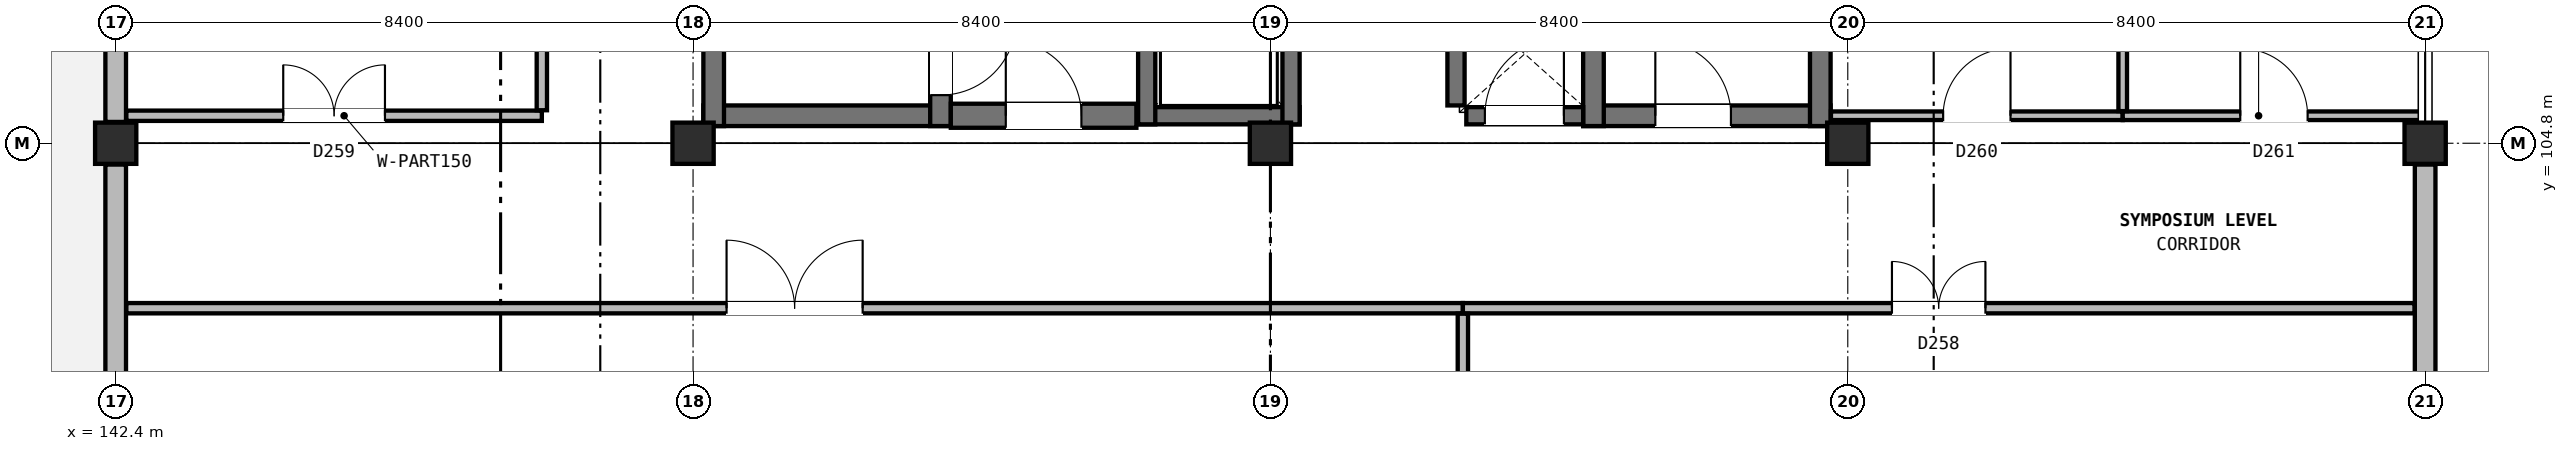
"""IFC4 building model, lengths in metres.
Left out: names, types, materials, properties, quantities, classifications, styles, units other than length and angle.
Written with IfcOpenShell. Run it as: python <this file> out.ifc"""

import sys

from ifc_helpers import new_model, si_unit, direction, frame, frame_2d, origin, origin_2d, place, context, subcontext, project, spatial, rectangle, extrude, element, fill, save


model = new_model("IFC4")
c1 = context("Model", 3, precision=1e-05, world=origin(), true_north=direction((0.0, 1.0)))
c2 = subcontext(c1, "Body", "Model", "MODEL_VIEW")
j1 = project(units=[si_unit("LENGTHUNIT", "METRE"), si_unit("PLANEANGLEUNIT", "RADIAN")], contexts=[c1])
p1 = place(None, origin())
s1 = spatial("IfcSite", under=j1, at=p1, CompositionType="ELEMENT")
p2 = place(p1, origin())
s2 = spatial("IfcBuilding", under=s1, at=p2, CompositionType="ELEMENT")
p3 = place(p2, frame((0.0, 0.0, 48.2)))
s3 = spatial("IfcBuildingStorey", under=s2, at=p3, CompositionType="ELEMENT", Elevation=48.2)
for number, where, z_axis, x_axis in (
    (1, (142.4, 104.8, 0.0), (0.0, 0.0, 1.0), (1.0, 0.0, 0.0)),
    (2, (150.8, 104.8, 0.0), (0.0, 0.0, 1.0), (1.0, 0.0, 0.0)),
    (3, (159.2, 104.8, 0.0), (0.0, 0.0, 1.0), (1.0, 0.0, 0.0)),
    (4, (167.6, 104.8, 0.0), (0.0, 0.0, 1.0), (1.0, 0.0, 0.0)),
    (5, (176.0, 104.8, 0.0), (0.0, 0.0, 1.0), (1.0, 0.0, 0.0)),
):
    element("IfcColumn", number, at=place(p3, frame(where, z_axis=z_axis, x_axis=x_axis)), inside=s3, PredefinedType="COLUMN", context=c2, shape_type="SweptSolid", body=[
        extrude(rectangle(XDim=0.6, YDim=0.6, at=origin_2d()), origin(), (0.0, 0.0, 1.0), 4.0),
    ])
p4 = place(p3, frame((176.0, 96.31, 0.0), z_axis=(0.0, 0.0, 1.0), x_axis=(0.0, 1.0, 0.0)))
e6 = element("IfcWall", 6, at=p4, inside=s3, PredefinedType="SOLIDWALL", context=c2, shape_type="SweptSolid", body=[
    extrude(rectangle(XDim=8.18, YDim=0.3, at=frame_2d((4.09, 0.0))), origin(), (0.0, 0.0, 1.0), 3.25),
])
p5 = place(p4, frame((2.005, 0.0, 0.9)))
e7 = element("IfcOpeningElement", 7, at=p5, cuts=e6, PredefinedType="OPENING", context=c2, shape_type="SweptSolid", body=[
    extrude(rectangle(XDim=2.08, YDim=2.04, at=frame_2d((1.04, 1.02))), frame((0.0, 0.16, 0.0), z_axis=(0.0, -1.0, 0.0), x_axis=(1.0, 0.0, 0.0)), (0.0, 0.0, 1.0), 0.32),
])
p6 = place(p3, frame((142.4, 113.29, 0.0), z_axis=(0.0, 0.0, 1.0), x_axis=(0.0, -1.0, 0.0)))
e8 = element("IfcWall", 8, at=p6, inside=s3, PredefinedType="SOLIDWALL", context=c2, shape_type="SweptSolid", body=[
    extrude(rectangle(XDim=8.18, YDim=0.3, at=frame_2d((4.09, 0.0))), origin(), (0.0, 0.0, 1.0), 3.25),
])
p7 = place(p6, frame((2.345, 0.0, 0.9)))
e9 = element("IfcOpeningElement", 9, at=p7, cuts=e8, PredefinedType="OPENING", context=c2, shape_type="SweptSolid", body=[
    extrude(rectangle(XDim=3.4, YDim=2.15, at=frame_2d((1.7, 1.075))), frame((0.0, 0.16, 0.0), z_axis=(0.0, -1.0, 0.0), x_axis=(1.0, 0.0, 0.0)), (0.0, 0.0, 1.0), 0.32),
])
p8 = place(p3, frame((142.4, 104.49, 0.0), z_axis=(0.0, 0.0, 1.0), x_axis=(0.0, -1.0, 0.0)))
e10 = element("IfcWall", 10, at=p8, inside=s3, PredefinedType="SOLIDWALL", context=c2, shape_type="SweptSolid", body=[
    extrude(rectangle(XDim=8.18, YDim=0.3, at=frame_2d((4.09, 0.0))), origin(), (0.0, 0.0, 1.0), 3.25),
])
p9 = place(p8, frame((3.415, 0.0, 0.0)))
e11 = element("IfcOpeningElement", 11, at=p9, cuts=e10, PredefinedType="OPENING", context=c2, shape_type="SweptSolid", body=[
    extrude(rectangle(XDim=1.35, YDim=2.25, at=frame_2d((0.675, 1.125))), frame((0.0, 0.16, 0.0), z_axis=(0.0, -1.0, 0.0), x_axis=(1.0, 0.0, 0.0)), (0.0, 0.0, 1.0), 0.32),
])
p10 = place(p3, frame((150.95, 105.2, 0.0), z_axis=(0.0, 0.0, 1.0), x_axis=(1.0, 0.0, 0.0)))
e12 = element("IfcWall", 12, at=p10, inside=s3, PredefinedType="SHEAR", context=c2, shape_type="SweptSolid", body=[
    extrude(rectangle(XDim=3.6, YDim=0.3, at=frame_2d((1.8, 0.0))), origin(), (0.0, 0.0, 1.0), 4.0),
])
p11 = place(p3, frame((151.1, 105.05, 0.0), z_axis=(0.0, 0.0, 1.0), x_axis=(0.0, 1.0, 0.0)))
e13 = element("IfcWall", 13, at=p11, inside=s3, PredefinedType="SHEAR", context=c2, shape_type="SweptSolid", body=[
    extrude(rectangle(XDim=8.3, YDim=0.3, at=frame_2d((4.15, 0.0))), origin(), (0.0, 0.0, 1.0), 4.0),
])
p12 = place(p3, frame((154.4, 105.05, 0.0), z_axis=(0.0, 0.0, 1.0), x_axis=(0.0, 1.0, 0.0)))
e14 = element("IfcWall", 14, at=p12, inside=s3, PredefinedType="SHEAR", context=c2, shape_type="SweptSolid", body=[
    extrude(rectangle(XDim=8.3, YDim=0.3, at=frame_2d((4.15, 0.0))), origin(), (0.0, 0.0, 1.0), 4.0),
])
p13 = place(p12, frame((0.45, 0.0, 0.0)))
e15 = element("IfcOpeningElement", 15, at=p13, cuts=e14, PredefinedType="OPENING", context=c2, shape_type="SweptSolid", body=[
    extrude(rectangle(XDim=1.1, YDim=2.2, at=frame_2d((0.55, 1.1))), frame((0.0, 0.16, 0.0), z_axis=(0.0, -1.0, 0.0), x_axis=(1.0, 0.0, 0.0)), (0.0, 0.0, 1.0), 0.32),
])
p14 = place(p3, frame((163.75, 105.2, 0.0), z_axis=(0.0, 0.0, 1.0), x_axis=(1.0, 0.0, 0.0)))
e16 = element("IfcWall", 16, at=p14, inside=s3, PredefinedType="SHEAR", context=c2, shape_type="SweptSolid", body=[
    extrude(rectangle(XDim=3.6, YDim=0.3, at=frame_2d((1.8, 0.0))), origin(), (0.0, 0.0, 1.0), 4.0),
])
p15 = place(p14, frame((1.05, 0.0, 0.0)))
e17 = element("IfcOpeningElement", 17, at=p15, cuts=e16, PredefinedType="OPENING", context=c2, shape_type="SweptSolid", body=[
    extrude(rectangle(XDim=1.1, YDim=2.2, at=frame_2d((0.55, 1.1))), frame((0.0, 0.16, 0.0), z_axis=(0.0, -1.0, 0.0), x_axis=(1.0, 0.0, 0.0)), (0.0, 0.0, 1.0), 0.32),
])
for number, where, z_axis, x_axis in (
    (18, (163.9, 105.05, 0.0), (0.0, 0.0, 1.0), (0.0, 1.0, 0.0)),
    (19, (167.2, 105.05, 0.0), (0.0, 0.0, 1.0), (0.0, 1.0, 0.0)),
):
    element("IfcWall", number, at=place(p3, frame(where, z_axis=z_axis, x_axis=x_axis)), inside=s3, PredefinedType="SHEAR", context=c2, shape_type="SweptSolid", body=[
        extrude(rectangle(XDim=8.3, YDim=0.3, at=frame_2d((4.15, 0.0))), origin(), (0.0, 0.0, 1.0), 4.0),
    ])
p16 = place(p3, frame((157.275, 105.2, 0.0), z_axis=(0.0, 0.0, 1.0), x_axis=(1.0, 0.0, 0.0)))
e20 = element("IfcWall", 20, at=p16, inside=s3, PredefinedType="SOLIDWALL", context=c2, shape_type="SweptSolid", body=[
    extrude(rectangle(XDim=2.35, YDim=0.25, at=frame_2d((1.175, 0.0))), origin(), (0.0, 0.0, 1.0), 3.68),
])
for number, where, z_axis, x_axis in (
    (21, (157.4, 105.075, 0.0), (0.0, 0.0, 1.0), (0.0, 1.0, 0.0)),
    (22, (159.5, 105.075, 0.0), (0.0, 0.0, 1.0), (0.0, 1.0, 0.0)),
):
    element("IfcWall", number, at=place(p3, frame(where, z_axis=z_axis, x_axis=x_axis)), inside=s3, PredefinedType="SOLIDWALL", context=c2, shape_type="SweptSolid", body=[
        extrude(rectangle(XDim=2.65, YDim=0.25, at=frame_2d((1.325, 0.0))), origin(), (0.0, 0.0, 1.0), 3.68),
    ])
p17 = place(p3, frame((154.55, 105.2, 0.0), z_axis=(0.0, 0.0, 1.0), x_axis=(1.0, 0.0, 0.0)))
e23 = element("IfcWall", 23, at=p17, inside=s3, PredefinedType="SHEAR", context=c2, shape_type="SweptSolid", body=[
    extrude(rectangle(XDim=2.7, YDim=0.35, at=frame_2d((1.35, 0.0))), origin(), (0.0, 0.0, 1.0), 3.68),
])
p18 = place(p17, frame((0.8, 0.0, 0.0)))
e24 = element("IfcOpeningElement", 24, at=p18, cuts=e23, PredefinedType="OPENING", context=c2, shape_type="SweptSolid", body=[
    extrude(rectangle(XDim=1.1, YDim=2.2, at=frame_2d((0.55, 1.1))), frame((0.0, 0.185, 0.0), z_axis=(0.0, -1.0, 0.0), x_axis=(1.0, 0.0, 0.0)), (0.0, 0.0, 1.0), 0.37),
])
p19 = place(p3, frame((161.9, 105.35, 0.0), z_axis=(0.0, 0.0, 1.0), x_axis=(0.0, 1.0, 0.0)))
e25 = element("IfcWall", 25, at=p19, inside=s3, PredefinedType="SOLIDWALL", context=c2, shape_type="SweptSolid", body=[
    extrude(rectangle(XDim=1.5, YDim=0.25, at=frame_2d((0.75, 0.0))), origin(), (0.0, 0.0, 1.0), 3.68),
])
p20 = place(p3, frame((162.05, 105.2, 0.0), z_axis=(0.0, 0.0, 1.0), x_axis=(1.0, 0.0, 0.0)))
e26 = element("IfcWall", 26, at=p20, inside=s3, PredefinedType="SOLIDWALL", context=c2, shape_type="SweptSolid", body=[
    extrude(rectangle(XDim=1.7, YDim=0.25, at=frame_2d((0.85, 0.0))), origin(), (0.0, 0.0, 1.0), 3.68),
])
p21 = place(p20, frame((0.27, 0.0, 0.0)))
e27 = element("IfcOpeningElement", 27, at=p21, cuts=e26, PredefinedType="OPENING", context=c2, shape_type="SweptSolid", body=[
    extrude(rectangle(XDim=1.15, YDim=2.2, at=frame_2d((0.575, 1.1))), frame((0.0, 0.135, 0.0), z_axis=(0.0, -1.0, 0.0), x_axis=(1.0, 0.0, 0.0)), (0.0, 0.0, 1.0), 0.27),
])
p22 = place(p3, frame((142.555, 102.4, 0.0), z_axis=(0.0, 0.0, 1.0), x_axis=(1.0, 0.0, 0.0)))
e28 = element("IfcWall", 28, at=p22, inside=s3, PredefinedType="PARTITIONING", context=c2, shape_type="SweptSolid", body=[
    extrude(rectangle(XDim=19.445, YDim=0.15, at=frame_2d((9.723, 0.0))), origin(), (0.0, 0.0, 1.0), 3.665),
])
p23 = place(p22, frame((8.732, 0.0, 0.0)))
e29 = element("IfcOpeningElement", 29, at=p23, cuts=e28, PredefinedType="OPENING", context=c2, shape_type="SweptSolid", body=[
    extrude(rectangle(XDim=1.98, YDim=2.4, at=frame_2d((0.99, 1.2))), frame((0.0, 0.085, 0.0), z_axis=(0.0, -1.0, 0.0), x_axis=(1.0, 0.0, 0.0)), (0.0, 0.0, 1.0), 0.17),
])
p24 = place(p3, frame((162.0, 102.4, 0.0), z_axis=(0.0, 0.0, 1.0), x_axis=(1.0, 0.0, 0.0)))
e30 = element("IfcWall", 30, at=p24, inside=s3, PredefinedType="PARTITIONING", context=c2, shape_type="SweptSolid", body=[
    extrude(rectangle(XDim=13.845, YDim=0.15, at=frame_2d((6.922, 0.0))), origin(), (0.0, 0.0, 1.0), 3.665),
])
p25 = place(p24, frame((6.242, 0.0, 0.0)))
e31 = element("IfcOpeningElement", 31, at=p25, cuts=e30, PredefinedType="OPENING", context=c2, shape_type="SweptSolid", body=[
    extrude(rectangle(XDim=1.36, YDim=2.26, at=frame_2d((0.68, 1.13))), frame((0.0, 0.085, 0.0), z_axis=(0.0, -1.0, 0.0), x_axis=(1.0, 0.0, 0.0)), (0.0, 0.0, 1.0), 0.17),
])
p26 = place(p3, frame((142.555, 105.2, 0.0), z_axis=(0.0, 0.0, 1.0), x_axis=(1.0, 0.0, 0.0)))
e32 = element("IfcWall", 32, at=p26, inside=s3, PredefinedType="PARTITIONING", context=c2, shape_type="SweptSolid", body=[
    extrude(rectangle(XDim=6.045, YDim=0.15, at=frame_2d((3.022, 0.0))), origin(), (0.0, 0.0, 1.0), 3.245),
])
p27 = place(p26, frame((2.282, 0.0, 0.0)))
e33 = element("IfcOpeningElement", 33, at=p27, cuts=e32, PredefinedType="OPENING", context=c2, shape_type="SweptSolid", body=[
    extrude(rectangle(XDim=1.48, YDim=2.2, at=frame_2d((0.74, 1.1))), frame((0.0, 0.085, 0.0), z_axis=(0.0, -1.0, 0.0), x_axis=(1.0, 0.0, 0.0)), (0.0, 0.0, 1.0), 0.17),
])
p28 = place(p3, frame((167.355, 105.2, 0.0), z_axis=(0.0, 0.0, 1.0), x_axis=(1.0, 0.0, 0.0)))
e34 = element("IfcWall", 34, at=p28, inside=s3, PredefinedType="PARTITIONING", context=c2, shape_type="SweptSolid", body=[
    extrude(rectangle(XDim=4.245, YDim=0.125, at=frame_2d((2.123, 0.0))), origin(), (0.0, 0.0, 1.0), 3.245),
])
p29 = place(p28, frame((1.633, 0.0, 0.0)))
e35 = element("IfcOpeningElement", 35, at=p29, cuts=e34, PredefinedType="OPENING", context=c2, shape_type="SweptSolid", body=[
    extrude(rectangle(XDim=0.98, YDim=2.1, at=frame_2d((0.49, 1.05))), frame((0.0, 0.073, 0.0), z_axis=(0.0, -1.0, 0.0), x_axis=(1.0, 0.0, 0.0)), (0.0, 0.0, 1.0), 0.145),
])
p30 = place(p3, frame((171.6, 105.2, 0.0), z_axis=(0.0, 0.0, 1.0), x_axis=(1.0, 0.0, 0.0)))
e36 = element("IfcWall", 36, at=p30, inside=s3, PredefinedType="PARTITIONING", context=c2, shape_type="SweptSolid", body=[
    extrude(rectangle(XDim=4.4, YDim=0.125, at=frame_2d((2.2, 0.0))), origin(), (0.0, 0.0, 1.0), 3.245),
])
p31 = place(p30, frame((1.71, 0.0, 0.0)))
e37 = element("IfcOpeningElement", 37, at=p31, cuts=e36, PredefinedType="OPENING", context=c2, shape_type="SweptSolid", body=[
    extrude(rectangle(XDim=0.98, YDim=2.1, at=frame_2d((0.49, 1.05))), frame((0.0, 0.073, 0.0), z_axis=(0.0, -1.0, 0.0), x_axis=(1.0, 0.0, 0.0)), (0.0, 0.0, 1.0), 0.145),
])
p32 = place(p3, frame((148.6, 105.28, 0.0), z_axis=(0.0, 0.0, 1.0), x_axis=(0.0, 1.0, 0.0)))
e38 = element("IfcWall", 38, at=p32, inside=s3, PredefinedType="PARTITIONING", context=c2, shape_type="SweptSolid", body=[
    extrude(rectangle(XDim=14.12, YDim=0.15, at=frame_2d((7.06, 0.0))), origin(), (0.0, 0.0, 1.0), 3.665),
])
p33 = place(p3, frame((162.0, 87.2, 0.0), z_axis=(0.0, 0.0, 1.0), x_axis=(0.0, 1.0, 0.0)))
e39 = element("IfcWall", 39, at=p33, inside=s3, PredefinedType="PARTITIONING", context=c2, shape_type="SweptSolid", body=[
    extrude(rectangle(XDim=15.12, YDim=0.15, at=frame_2d((7.56, 0.0))), origin(), (0.0, 0.0, 1.0), 3.665),
])
p34 = place(p3, frame((171.6, 105.268, 0.0), z_axis=(0.0, 0.0, 1.0), x_axis=(0.0, 1.0, 0.0)))
e40 = element("IfcWall", 40, at=p34, inside=s3, PredefinedType="PARTITIONING", context=c2, shape_type="SweptSolid", body=[
    extrude(rectangle(XDim=16.978, YDim=0.125, at=frame_2d((8.489, 0.0))), origin(), (0.0, 0.0, 1.0), 3.665),
])
p35 = place(p13, frame((1.1, 0.0, 0.0), z_axis=(0.0, 0.0, 1.0), x_axis=(-1.0, 0.0, 0.0)))
e41 = element("IfcDoor", 41, at=p35, inside=s3, OperationType="SINGLE_SWING_RIGHT", PredefinedType="DOOR", context=c2, shape_type="SweptSolid", body=[
    extrude(rectangle(XDim=1.1, YDim=2.2, at=frame_2d((0.55, 1.1))), frame((0.0, 0.025, 0.0), z_axis=(0.0, -1.0, 0.0), x_axis=(1.0, 0.0, 0.0)), (0.0, 0.0, 1.0), 0.05),
])
fill(e15, e41)
p36 = place(p15, origin())
e42 = element("IfcDoor", 42, at=p36, inside=s3, OperationType="SINGLE_SWING_LEFT", PredefinedType="DOOR", context=c2, shape_type="SweptSolid", body=[
    extrude(rectangle(XDim=1.1, YDim=2.2, at=frame_2d((0.55, 1.1))), frame((0.0, 0.025, 0.0), z_axis=(0.0, -1.0, 0.0), x_axis=(1.0, 0.0, 0.0)), (0.0, 0.0, 1.0), 0.05),
])
fill(e17, e42)
p37 = place(p18, origin())
e43 = element("IfcDoor", 43, at=p37, inside=s3, OperationType="SINGLE_SWING_LEFT", PredefinedType="DOOR", context=c2, shape_type="SweptSolid", body=[
    extrude(rectangle(XDim=1.1, YDim=2.2, at=frame_2d((0.55, 1.1))), frame((0.0, 0.025, 0.0), z_axis=(0.0, -1.0, 0.0), x_axis=(1.0, 0.0, 0.0)), (0.0, 0.0, 1.0), 0.05),
])
fill(e24, e43)
p38 = place(p21, origin())
e44 = element("IfcDoor", 44, at=p38, inside=s3, OperationType="SINGLE_SWING_RIGHT", PredefinedType="DOOR", context=c2, shape_type="SweptSolid", body=[
    extrude(rectangle(XDim=1.15, YDim=2.2, at=frame_2d((0.575, 1.1))), frame((0.0, 0.025, 0.0), z_axis=(0.0, -1.0, 0.0), x_axis=(1.0, 0.0, 0.0)), (0.0, 0.0, 1.0), 0.05),
])
fill(e27, e44)
p39 = place(p23, origin())
e45 = element("IfcDoor", 45, at=p39, inside=s3, OperationType="DOUBLE_DOOR_SINGLE_SWING", PredefinedType="DOOR", context=c2, shape_type="SweptSolid", body=[
    extrude(rectangle(XDim=1.98, YDim=2.4, at=frame_2d((0.99, 1.2))), frame((0.0, 0.025, 0.0), z_axis=(0.0, -1.0, 0.0), x_axis=(1.0, 0.0, 0.0)), (0.0, 0.0, 1.0), 0.05),
])
fill(e29, e45)
p40 = place(p25, origin())
e46 = element("IfcDoor", 46, at=p40, inside=s3, OperationType="DOUBLE_DOOR_SINGLE_SWING", PredefinedType="DOOR", context=c2, shape_type="SweptSolid", body=[
    extrude(rectangle(XDim=1.36, YDim=2.26, at=frame_2d((0.68, 1.13))), frame((0.0, 0.025, 0.0), z_axis=(0.0, -1.0, 0.0), x_axis=(1.0, 0.0, 0.0)), (0.0, 0.0, 1.0), 0.05),
])
fill(e31, e46)
p41 = place(p27, origin())
e47 = element("IfcDoor", 47, at=p41, inside=s3, OperationType="DOUBLE_DOOR_SINGLE_SWING", PredefinedType="DOOR", context=c2, shape_type="SweptSolid", body=[
    extrude(rectangle(XDim=1.48, YDim=2.2, at=frame_2d((0.74, 1.1))), frame((0.0, 0.025, 0.0), z_axis=(0.0, -1.0, 0.0), x_axis=(1.0, 0.0, 0.0)), (0.0, 0.0, 1.0), 0.05),
])
fill(e33, e47)
p42 = place(p29, origin())
e48 = element("IfcDoor", 48, at=p42, inside=s3, OperationType="SINGLE_SWING_RIGHT", PredefinedType="DOOR", context=c2, shape_type="SweptSolid", body=[
    extrude(rectangle(XDim=0.98, YDim=2.1, at=frame_2d((0.49, 1.05))), frame((0.0, 0.025, 0.0), z_axis=(0.0, -1.0, 0.0), x_axis=(1.0, 0.0, 0.0)), (0.0, 0.0, 1.0), 0.05),
])
fill(e35, e48)
p43 = place(p31, origin())
e49 = element("IfcDoor", 49, at=p43, inside=s3, OperationType="SINGLE_SWING_LEFT", PredefinedType="DOOR", context=c2, shape_type="SweptSolid", body=[
    extrude(rectangle(XDim=0.98, YDim=2.1, at=frame_2d((0.49, 1.05))), frame((0.0, 0.025, 0.0), z_axis=(0.0, -1.0, 0.0), x_axis=(1.0, 0.0, 0.0)), (0.0, 0.0, 1.0), 0.05),
])
fill(e37, e49)
save(model, sys.argv[1])
